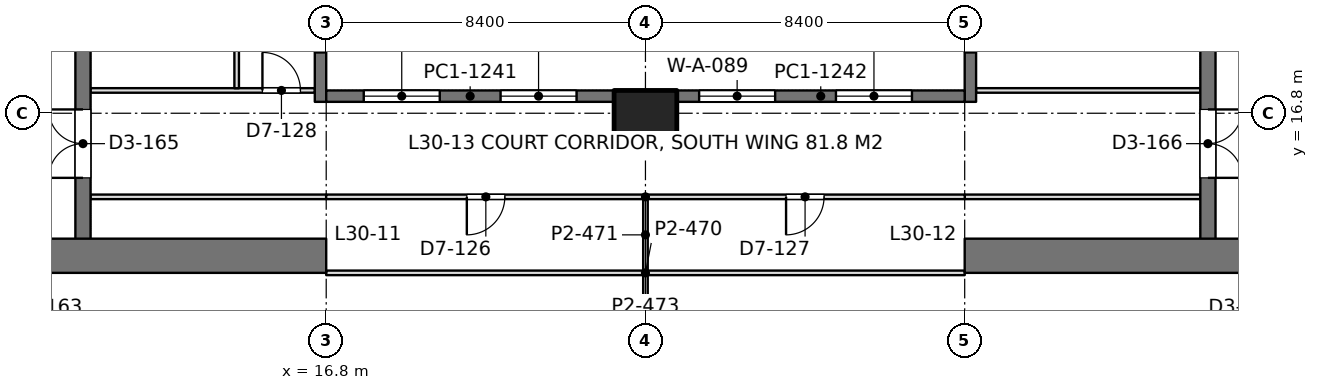
"""IFC4 building model, lengths in metres.
Left out: names, types, materials, properties, quantities, classifications, styles, units other than length and angle.
Written with IfcOpenShell. Run it as: python <this file> out.ifc"""

import sys

from ifc_helpers import new_model, si_unit, direction, frame, frame_2d, origin, origin_2d, place, context, subcontext, project, spatial, rectangle, extrude, element, fill, save


model = new_model("IFC4")
c1 = context("Model", 3, precision=1e-05, world=origin(), true_north=direction((0.0, 1.0)))
c2 = subcontext(c1, "Body", "Model", "MODEL_VIEW")
j1 = project(units=[si_unit("LENGTHUNIT", "METRE"), si_unit("PLANEANGLEUNIT", "RADIAN")], contexts=[c1])
p1 = place(None, origin())
s1 = spatial("IfcSite", under=j1, at=p1, CompositionType="ELEMENT")
p2 = place(p1, origin())
s2 = spatial("IfcBuilding", under=s1, at=p2, CompositionType="ELEMENT")
p3 = place(p2, frame((0.0, 0.0, 134.4)))
s3 = spatial("IfcBuildingStorey", under=s2, at=p3, CompositionType="ELEMENT", Elevation=134.4)
p4 = place(p3, frame((25.2, 16.8, 0.0), z_axis=(0.0, 0.0, 1.0), x_axis=(1.0, 0.0, 0.0)))
e1 = element("IfcColumn", 1, at=p4, inside=s3, PredefinedType="COLUMN", context=c2, shape_type="SweptSolid", body=[
    extrude(rectangle(XDim=1.65, YDim=1.2, at=origin_2d()), origin(), (0.0, 0.0, 1.0), 4.2),
])
p5 = place(p3, frame((-1.2, 13.05, 0.0), z_axis=(0.0, 0.0, 1.0), x_axis=(1.0, 0.0, 0.0)))
e2 = element("IfcWall", 2, at=p5, inside=s3, PredefinedType="SHEAR", context=c2, shape_type="SweptSolid", body=[
    extrude(rectangle(XDim=18.0, YDim=0.9, at=frame_2d((9.0, 0.0))), origin(), (0.0, 0.0, 1.0), 4.2),
])
p6 = place(p5, frame((8.95, 0.0, 0.0)))
e3 = element("IfcOpeningElement", 3, at=p6, cuts=e2, PredefinedType="OPENING", context=c2, shape_type="SweptSolid", body=[
    extrude(rectangle(XDim=1.8, YDim=2.4, at=frame_2d((0.9, 1.2))), frame((0.0, 0.46, 0.0), z_axis=(0.0, -1.0, 0.0), x_axis=(1.0, 0.0, 0.0)), (0.0, 0.0, 1.0), 0.92),
])
p7 = place(p3, frame((10.4, 13.05, 0.0), z_axis=(0.0, 0.0, 1.0), x_axis=(0.0, 1.0, 0.0)))
e4 = element("IfcWall", 4, at=p7, inside=s3, PredefinedType="SHEAR", context=c2, shape_type="SweptSolid", body=[
    extrude(rectangle(XDim=24.3, YDim=0.4, at=frame_2d((12.15, 0.0))), origin(), (0.0, 0.0, 1.0), 4.2),
])
p8 = place(p7, frame((10.05, 0.0, 0.0)))
e5 = element("IfcOpeningElement", 5, at=p8, cuts=e4, PredefinedType="OPENING", context=c2, shape_type="SweptSolid", body=[
    extrude(rectangle(XDim=1.1, YDim=2.2, at=frame_2d((0.55, 1.1))), frame((0.0, 0.21, 0.0), z_axis=(0.0, -1.0, 0.0), x_axis=(1.0, 0.0, 0.0)), (0.0, 0.0, 1.0), 0.42),
])
p9 = place(p7, frame((12.9, 0.0, 0.0)))
e6 = element("IfcOpeningElement", 6, at=p9, cuts=e4, PredefinedType="OPENING", context=c2, shape_type="SweptSolid", body=[
    extrude(rectangle(XDim=1.1, YDim=2.2, at=frame_2d((0.55, 1.1))), frame((0.0, 0.21, 0.0), z_axis=(0.0, -1.0, 0.0), x_axis=(1.0, 0.0, 0.0)), (0.0, 0.0, 1.0), 0.42),
])
p10 = place(p7, frame((21.45, 0.0, 0.0)))
e7 = element("IfcOpeningElement", 7, at=p10, cuts=e4, PredefinedType="OPENING", context=c2, shape_type="SweptSolid", body=[
    extrude(rectangle(XDim=1.1, YDim=2.2, at=frame_2d((0.55, 1.1))), frame((0.0, 0.21, 0.0), z_axis=(0.0, -1.0, 0.0), x_axis=(1.0, 0.0, 0.0)), (0.0, 0.0, 1.0), 0.42),
])
p11 = place(p7, frame((2.05, 0.0, 0.0)))
e8 = element("IfcOpeningElement", 8, at=p11, cuts=e4, PredefinedType="OPENING", context=c2, shape_type="SweptSolid", body=[
    extrude(rectangle(XDim=1.8, YDim=2.4, at=frame_2d((0.9, 1.2))), frame((0.0, 0.21, 0.0), z_axis=(0.0, -1.0, 0.0), x_axis=(1.0, 0.0, 0.0)), (0.0, 0.0, 1.0), 0.42),
])
p12 = place(p7, frame((5.8, 0.0, 0.0)))
e9 = element("IfcOpeningElement", 9, at=p12, cuts=e4, PredefinedType="OPENING", context=c2, shape_type="SweptSolid", body=[
    extrude(rectangle(XDim=1.8, YDim=2.4, at=frame_2d((0.9, 1.2))), frame((0.0, 0.21, 0.0), z_axis=(0.0, -1.0, 0.0), x_axis=(1.0, 0.0, 0.0)), (0.0, 0.0, 1.0), 0.42),
])
p13 = place(p3, frame((33.6, 13.05, 0.0), z_axis=(0.0, 0.0, 1.0), x_axis=(1.0, 0.0, 0.0)))
e10 = element("IfcWall", 10, at=p13, inside=s3, PredefinedType="SHEAR", context=c2, shape_type="SweptSolid", body=[
    extrude(rectangle(XDim=18.0, YDim=0.9, at=frame_2d((9.0, 0.0))), origin(), (0.0, 0.0, 1.0), 4.2),
])
p14 = place(p13, frame((7.25, 0.0, 0.0)))
e11 = element("IfcOpeningElement", 11, at=p14, cuts=e10, PredefinedType="OPENING", context=c2, shape_type="SweptSolid", body=[
    extrude(rectangle(XDim=1.8, YDim=2.4, at=frame_2d((0.9, 1.2))), frame((0.0, 0.46, 0.0), z_axis=(0.0, -1.0, 0.0), x_axis=(1.0, 0.0, 0.0)), (0.0, 0.0, 1.0), 0.92),
])
p15 = place(p3, frame((40.0, 13.05, 0.0), z_axis=(0.0, 0.0, 1.0), x_axis=(0.0, 1.0, 0.0)))
e12 = element("IfcWall", 12, at=p15, inside=s3, PredefinedType="SHEAR", context=c2, shape_type="SweptSolid", body=[
    extrude(rectangle(XDim=24.3, YDim=0.4, at=frame_2d((12.15, 0.0))), origin(), (0.0, 0.0, 1.0), 4.2),
])
p16 = place(p15, frame((10.05, 0.0, 0.0)))
e13 = element("IfcOpeningElement", 13, at=p16, cuts=e12, PredefinedType="OPENING", context=c2, shape_type="SweptSolid", body=[
    extrude(rectangle(XDim=1.1, YDim=2.2, at=frame_2d((0.55, 1.1))), frame((0.0, 0.21, 0.0), z_axis=(0.0, -1.0, 0.0), x_axis=(1.0, 0.0, 0.0)), (0.0, 0.0, 1.0), 0.42),
])
p17 = place(p15, frame((12.9, 0.0, 0.0)))
e14 = element("IfcOpeningElement", 14, at=p17, cuts=e12, PredefinedType="OPENING", context=c2, shape_type="SweptSolid", body=[
    extrude(rectangle(XDim=1.1, YDim=2.2, at=frame_2d((0.55, 1.1))), frame((0.0, 0.21, 0.0), z_axis=(0.0, -1.0, 0.0), x_axis=(1.0, 0.0, 0.0)), (0.0, 0.0, 1.0), 0.42),
])
p18 = place(p15, frame((21.45, 0.0, 0.0)))
e15 = element("IfcOpeningElement", 15, at=p18, cuts=e12, PredefinedType="OPENING", context=c2, shape_type="SweptSolid", body=[
    extrude(rectangle(XDim=1.1, YDim=2.2, at=frame_2d((0.55, 1.1))), frame((0.0, 0.21, 0.0), z_axis=(0.0, -1.0, 0.0), x_axis=(1.0, 0.0, 0.0)), (0.0, 0.0, 1.0), 0.42),
])
p19 = place(p15, frame((2.05, 0.0, 0.0)))
e16 = element("IfcOpeningElement", 16, at=p19, cuts=e12, PredefinedType="OPENING", context=c2, shape_type="SweptSolid", body=[
    extrude(rectangle(XDim=1.8, YDim=2.4, at=frame_2d((0.9, 1.2))), frame((0.0, 0.21, 0.0), z_axis=(0.0, -1.0, 0.0), x_axis=(1.0, 0.0, 0.0)), (0.0, 0.0, 1.0), 0.42),
])
p20 = place(p15, frame((5.8, 0.0, 0.0)))
e17 = element("IfcOpeningElement", 17, at=p20, cuts=e12, PredefinedType="OPENING", context=c2, shape_type="SweptSolid", body=[
    extrude(rectangle(XDim=1.8, YDim=2.4, at=frame_2d((0.9, 1.2))), frame((0.0, 0.21, 0.0), z_axis=(0.0, -1.0, 0.0), x_axis=(1.0, 0.0, 0.0)), (0.0, 0.0, 1.0), 0.42),
])
p21 = place(p3, frame((16.65, 17.1, 0.0), z_axis=(0.0, 0.0, 1.0), x_axis=(0.0, 1.0, 0.0)))
e18 = element("IfcWall", 18, at=p21, inside=s3, PredefinedType="SOLIDWALL", context=c2, shape_type="SweptSolid", body=[
    extrude(rectangle(XDim=5.0, YDim=0.3, at=frame_2d((2.5, 0.0))), origin(), (0.0, 0.0, 1.0), 4.05),
])
p22 = place(p21, frame((1.3, 0.0, 0.1)))
e19 = element("IfcOpeningElement", 19, at=p22, cuts=e18, PredefinedType="OPENING", context=c2, shape_type="SweptSolid", body=[
    extrude(rectangle(XDim=2.0, YDim=3.0, at=frame_2d((1.0, 1.5))), frame((0.0, 0.16, 0.0), z_axis=(0.0, -1.0, 0.0), x_axis=(1.0, 0.0, 0.0)), (0.0, 0.0, 1.0), 0.32),
])
p23 = place(p3, frame((33.75, 17.1, 0.0), z_axis=(0.0, 0.0, 1.0), x_axis=(0.0, 1.0, 0.0)))
e20 = element("IfcWall", 20, at=p23, inside=s3, PredefinedType="SOLIDWALL", context=c2, shape_type="SweptSolid", body=[
    extrude(rectangle(XDim=5.0, YDim=0.3, at=frame_2d((2.5, 0.0))), origin(), (0.0, 0.0, 1.0), 4.05),
])
p24 = place(p23, frame((1.3, 0.0, 0.1)))
e21 = element("IfcOpeningElement", 21, at=p24, cuts=e20, PredefinedType="OPENING", context=c2, shape_type="SweptSolid", body=[
    extrude(rectangle(XDim=2.0, YDim=3.0, at=frame_2d((1.0, 1.5))), frame((0.0, 0.16, 0.0), z_axis=(0.0, -1.0, 0.0), x_axis=(1.0, 0.0, 0.0)), (0.0, 0.0, 1.0), 0.32),
])
p25 = place(p3, frame((16.8, 17.25, 0.0), z_axis=(0.0, 0.0, 1.0), x_axis=(1.0, 0.0, 0.0)))
e22 = element("IfcWall", 22, at=p25, inside=s3, PredefinedType="SOLIDWALL", context=c2, shape_type="SweptSolid", body=[
    extrude(rectangle(XDim=7.575, YDim=0.3, at=frame_2d((3.788, 0.0))), origin(), (0.0, 0.0, 1.0), 4.05),
])
p26 = place(p25, frame((0.988, 0.0, 0.1)))
e23 = element("IfcOpeningElement", 23, at=p26, cuts=e22, PredefinedType="OPENING", context=c2, shape_type="SweptSolid", body=[
    extrude(rectangle(XDim=2.0, YDim=3.0, at=frame_2d((1.0, 1.5))), frame((0.0, 0.16, 0.0), z_axis=(0.0, -1.0, 0.0), x_axis=(1.0, 0.0, 0.0)), (0.0, 0.0, 1.0), 0.32),
])
p27 = place(p25, frame((4.587, 0.0, 0.1)))
e24 = element("IfcOpeningElement", 24, at=p27, cuts=e22, PredefinedType="OPENING", context=c2, shape_type="SweptSolid", body=[
    extrude(rectangle(XDim=2.0, YDim=3.0, at=frame_2d((1.0, 1.5))), frame((0.0, 0.16, 0.0), z_axis=(0.0, -1.0, 0.0), x_axis=(1.0, 0.0, 0.0)), (0.0, 0.0, 1.0), 0.32),
])
p28 = place(p3, frame((26.025, 17.25, 0.0), z_axis=(0.0, 0.0, 1.0), x_axis=(1.0, 0.0, 0.0)))
e25 = element("IfcWall", 25, at=p28, inside=s3, PredefinedType="SOLIDWALL", context=c2, shape_type="SweptSolid", body=[
    extrude(rectangle(XDim=7.575, YDim=0.3, at=frame_2d((3.788, 0.0))), origin(), (0.0, 0.0, 1.0), 4.05),
])
p29 = place(p28, frame((0.587, 0.0, 0.1)))
e26 = element("IfcOpeningElement", 26, at=p29, cuts=e25, PredefinedType="OPENING", context=c2, shape_type="SweptSolid", body=[
    extrude(rectangle(XDim=2.0, YDim=3.0, at=frame_2d((1.0, 1.5))), frame((0.0, 0.16, 0.0), z_axis=(0.0, -1.0, 0.0), x_axis=(1.0, 0.0, 0.0)), (0.0, 0.0, 1.0), 0.32),
])
p30 = place(p28, frame((4.188, 0.0, 0.1)))
e27 = element("IfcOpeningElement", 27, at=p30, cuts=e25, PredefinedType="OPENING", context=c2, shape_type="SweptSolid", body=[
    extrude(rectangle(XDim=2.0, YDim=3.0, at=frame_2d((1.0, 1.5))), frame((0.0, 0.16, 0.0), z_axis=(0.0, -1.0, 0.0), x_axis=(1.0, 0.0, 0.0)), (0.0, 0.0, 1.0), 0.32),
])
p31 = place(p3, frame((10.598, 17.4, 0.0), z_axis=(0.0, 0.0, 1.0), x_axis=(1.0, 0.0, 0.0)))
e28 = element("IfcWall", 28, at=p31, inside=s3, PredefinedType="PARTITIONING", context=c2, shape_type="SweptSolid", body=[
    extrude(rectangle(XDim=5.904, YDim=0.12, at=frame_2d((2.952, 0.0))), origin(), (0.0, 0.0, 1.0), 3.55),
])
p32 = place(p31, frame((4.524, 0.0, 0.0)))
e29 = element("IfcOpeningElement", 29, at=p32, cuts=e28, PredefinedType="OPENING", context=c2, shape_type="SweptSolid", body=[
    extrude(rectangle(XDim=1.0, YDim=2.4, at=frame_2d((0.5, 1.2))), frame((0.0, 0.07, 0.0), z_axis=(0.0, -1.0, 0.0), x_axis=(1.0, 0.0, 0.0)), (0.0, 0.0, 1.0), 0.14),
])
p33 = place(p3, frame((14.444, 17.458, 0.0), z_axis=(0.0, 0.0, 1.0), x_axis=(0.0, 1.0, 0.0)))
e30 = element("IfcWall", 30, at=p33, inside=s3, PredefinedType="PARTITIONING", context=c2, shape_type="SweptSolid", body=[
    extrude(rectangle(XDim=4.644, YDim=0.12, at=frame_2d((2.322, 0.0))), origin(), (0.0, 0.0, 1.0), 3.6),
])
p34 = place(p3, frame((33.898, 17.4, 0.0), z_axis=(0.0, 0.0, 1.0), x_axis=(1.0, 0.0, 0.0)))
e31 = element("IfcWall", 31, at=p34, inside=s3, PredefinedType="PARTITIONING", context=c2, shape_type="SweptSolid", body=[
    extrude(rectangle(XDim=5.904, YDim=0.12, at=frame_2d((2.952, 0.0))), origin(), (0.0, 0.0, 1.0), 3.55),
])
p35 = place(p3, frame((25.2, 9.099, 0.0), z_axis=(0.0, 0.0, 1.0), x_axis=(0.0, 1.0, 0.0)))
e32 = element("IfcWall", 32, at=p35, inside=s3, PredefinedType="PARTITIONING", context=c2, shape_type="SweptSolid", body=[
    extrude(rectangle(XDim=3.443, YDim=0.12, at=frame_2d((1.721, 0.0))), origin(), (0.0, 0.0, 1.0), 3.55),
])
for number, where, z_axis, x_axis in (
    (33, (10.598, 14.6, 0.0), (0.0, 0.0, 1.0), (1.0, 0.0, 0.0)),
    (34, (33.598, 14.6, 0.0), (0.0, 0.0, 1.0), (1.0, 0.0, 0.0)),
):
    element("IfcWall", number, at=place(p3, frame(where, z_axis=z_axis, x_axis=x_axis)), inside=s3, PredefinedType="PARTITIONING", context=c2, shape_type="SweptSolid", body=[
        extrude(rectangle(XDim=6.204, YDim=0.12, at=frame_2d((3.102, 0.0))), origin(), (0.0, 0.0, 1.0), 3.55),
    ])
p36 = place(p3, frame((25.2, 12.658, 0.0), z_axis=(0.0, 0.0, 1.0), x_axis=(0.0, 1.0, 0.0)))
e35 = element("IfcWall", 35, at=p36, inside=s3, PredefinedType="PARTITIONING", context=c2, shape_type="SweptSolid", body=[
    extrude(rectangle(XDim=1.884, YDim=0.12, at=frame_2d((0.942, 0.0))), origin(), (0.0, 0.0, 1.0), 3.55),
])
p37 = place(p3, frame((16.798, 14.6, 0.0), z_axis=(0.0, 0.0, 1.0), x_axis=(1.0, 0.0, 0.0)))
e36 = element("IfcWall", 36, at=p37, inside=s3, PredefinedType="PARTITIONING", context=c2, shape_type="SweptSolid", body=[
    extrude(rectangle(XDim=16.804, YDim=0.12, at=frame_2d((8.402, 0.0))), origin(), (0.0, 0.0, 1.0), 3.55),
])
p38 = place(p37, frame((3.702, 0.0, 0.0)))
e37 = element("IfcOpeningElement", 37, at=p38, cuts=e36, PredefinedType="OPENING", context=c2, shape_type="SweptSolid", body=[
    extrude(rectangle(XDim=1.0, YDim=2.4, at=frame_2d((0.5, 1.2))), frame((0.0, 0.07, 0.0), z_axis=(0.0, -1.0, 0.0), x_axis=(1.0, 0.0, 0.0)), (0.0, 0.0, 1.0), 0.14),
])
p39 = place(p37, frame((12.102, 0.0, 0.0)))
e38 = element("IfcOpeningElement", 38, at=p39, cuts=e36, PredefinedType="OPENING", context=c2, shape_type="SweptSolid", body=[
    extrude(rectangle(XDim=1.0, YDim=2.4, at=frame_2d((0.5, 1.2))), frame((0.0, 0.07, 0.0), z_axis=(0.0, -1.0, 0.0), x_axis=(1.0, 0.0, 0.0)), (0.0, 0.0, 1.0), 0.14),
])
p40 = place(p3, frame((16.8, 12.6, 0.0), z_axis=(0.0, 0.0, 1.0), x_axis=(1.0, 0.0, 0.0)))
e39 = element("IfcWall", 39, at=p40, inside=s3, PredefinedType="PARTITIONING", context=c2, shape_type="SweptSolid", body=[
    extrude(rectangle(XDim=16.8, YDim=0.12, at=frame_2d((8.4, 0.0))), origin(), (0.0, 0.0, 1.0), 3.55),
])
p41 = place(p26, origin())
e40 = element("IfcWindow", 40, at=p41, inside=s3, PartitioningType="SINGLE_PANEL", PredefinedType="WINDOW", context=c2, shape_type="SweptSolid", body=[
    extrude(rectangle(XDim=2.0, YDim=3.0, at=frame_2d((1.0, 1.5))), frame((0.0, 0.03, 0.0), z_axis=(0.0, -1.0, 0.0), x_axis=(1.0, 0.0, 0.0)), (0.0, 0.0, 1.0), 0.06),
])
fill(e23, e40)
p42 = place(p27, origin())
e41 = element("IfcWindow", 41, at=p42, inside=s3, PartitioningType="SINGLE_PANEL", PredefinedType="WINDOW", context=c2, shape_type="SweptSolid", body=[
    extrude(rectangle(XDim=2.0, YDim=3.0, at=frame_2d((1.0, 1.5))), frame((0.0, 0.03, 0.0), z_axis=(0.0, -1.0, 0.0), x_axis=(1.0, 0.0, 0.0)), (0.0, 0.0, 1.0), 0.06),
])
fill(e24, e41)
p43 = place(p29, origin())
e42 = element("IfcWindow", 42, at=p43, inside=s3, PartitioningType="SINGLE_PANEL", PredefinedType="WINDOW", context=c2, shape_type="SweptSolid", body=[
    extrude(rectangle(XDim=2.0, YDim=3.0, at=frame_2d((1.0, 1.5))), frame((0.0, 0.03, 0.0), z_axis=(0.0, -1.0, 0.0), x_axis=(1.0, 0.0, 0.0)), (0.0, 0.0, 1.0), 0.06),
])
fill(e26, e42)
p44 = place(p30, origin())
e43 = element("IfcWindow", 43, at=p44, inside=s3, PartitioningType="SINGLE_PANEL", PredefinedType="WINDOW", context=c2, shape_type="SweptSolid", body=[
    extrude(rectangle(XDim=2.0, YDim=3.0, at=frame_2d((1.0, 1.5))), frame((0.0, 0.03, 0.0), z_axis=(0.0, -1.0, 0.0), x_axis=(1.0, 0.0, 0.0)), (0.0, 0.0, 1.0), 0.06),
])
fill(e27, e43)
p45 = place(p11, origin())
e44 = element("IfcDoor", 44, at=p45, inside=s3, OperationType="DOUBLE_DOOR_SINGLE_SWING", PredefinedType="DOOR", context=c2, shape_type="SweptSolid", body=[
    extrude(rectangle(XDim=1.8, YDim=2.4, at=frame_2d((0.9, 1.2))), frame((0.0, 0.025, 0.0), z_axis=(0.0, -1.0, 0.0), x_axis=(1.0, 0.0, 0.0)), (0.0, 0.0, 1.0), 0.05),
])
fill(e8, e44)
p46 = place(p19, frame((1.8, 0.0, 0.0), z_axis=(0.0, 0.0, 1.0), x_axis=(-1.0, 0.0, 0.0)))
e45 = element("IfcDoor", 45, at=p46, inside=s3, OperationType="DOUBLE_DOOR_SINGLE_SWING", PredefinedType="DOOR", context=c2, shape_type="SweptSolid", body=[
    extrude(rectangle(XDim=1.8, YDim=2.4, at=frame_2d((0.9, 1.2))), frame((0.0, 0.025, 0.0), z_axis=(0.0, -1.0, 0.0), x_axis=(1.0, 0.0, 0.0)), (0.0, 0.0, 1.0), 0.05),
])
fill(e16, e45)
p47 = place(p32, origin())
e46 = element("IfcDoor", 46, at=p47, inside=s3, OperationType="SINGLE_SWING_LEFT", PredefinedType="DOOR", context=c2, shape_type="SweptSolid", body=[
    extrude(rectangle(XDim=1.0, YDim=2.4, at=frame_2d((0.5, 1.2))), frame((0.0, 0.025, 0.0), z_axis=(0.0, -1.0, 0.0), x_axis=(1.0, 0.0, 0.0)), (0.0, 0.0, 1.0), 0.05),
])
fill(e29, e46)
p48 = place(p38, frame((1.0, 0.0, 0.0), z_axis=(0.0, 0.0, 1.0), x_axis=(-1.0, 0.0, 0.0)))
e47 = element("IfcDoor", 47, at=p48, inside=s3, OperationType="SINGLE_SWING_RIGHT", PredefinedType="DOOR", context=c2, shape_type="SweptSolid", body=[
    extrude(rectangle(XDim=1.0, YDim=2.4, at=frame_2d((0.5, 1.2))), frame((0.0, 0.025, 0.0), z_axis=(0.0, -1.0, 0.0), x_axis=(1.0, 0.0, 0.0)), (0.0, 0.0, 1.0), 0.05),
])
fill(e37, e47)
p49 = place(p39, frame((1.0, 0.0, 0.0), z_axis=(0.0, 0.0, 1.0), x_axis=(-1.0, 0.0, 0.0)))
e48 = element("IfcDoor", 48, at=p49, inside=s3, OperationType="SINGLE_SWING_RIGHT", PredefinedType="DOOR", context=c2, shape_type="SweptSolid", body=[
    extrude(rectangle(XDim=1.0, YDim=2.4, at=frame_2d((0.5, 1.2))), frame((0.0, 0.025, 0.0), z_axis=(0.0, -1.0, 0.0), x_axis=(1.0, 0.0, 0.0)), (0.0, 0.0, 1.0), 0.05),
])
fill(e38, e48)
save(model, sys.argv[1])
